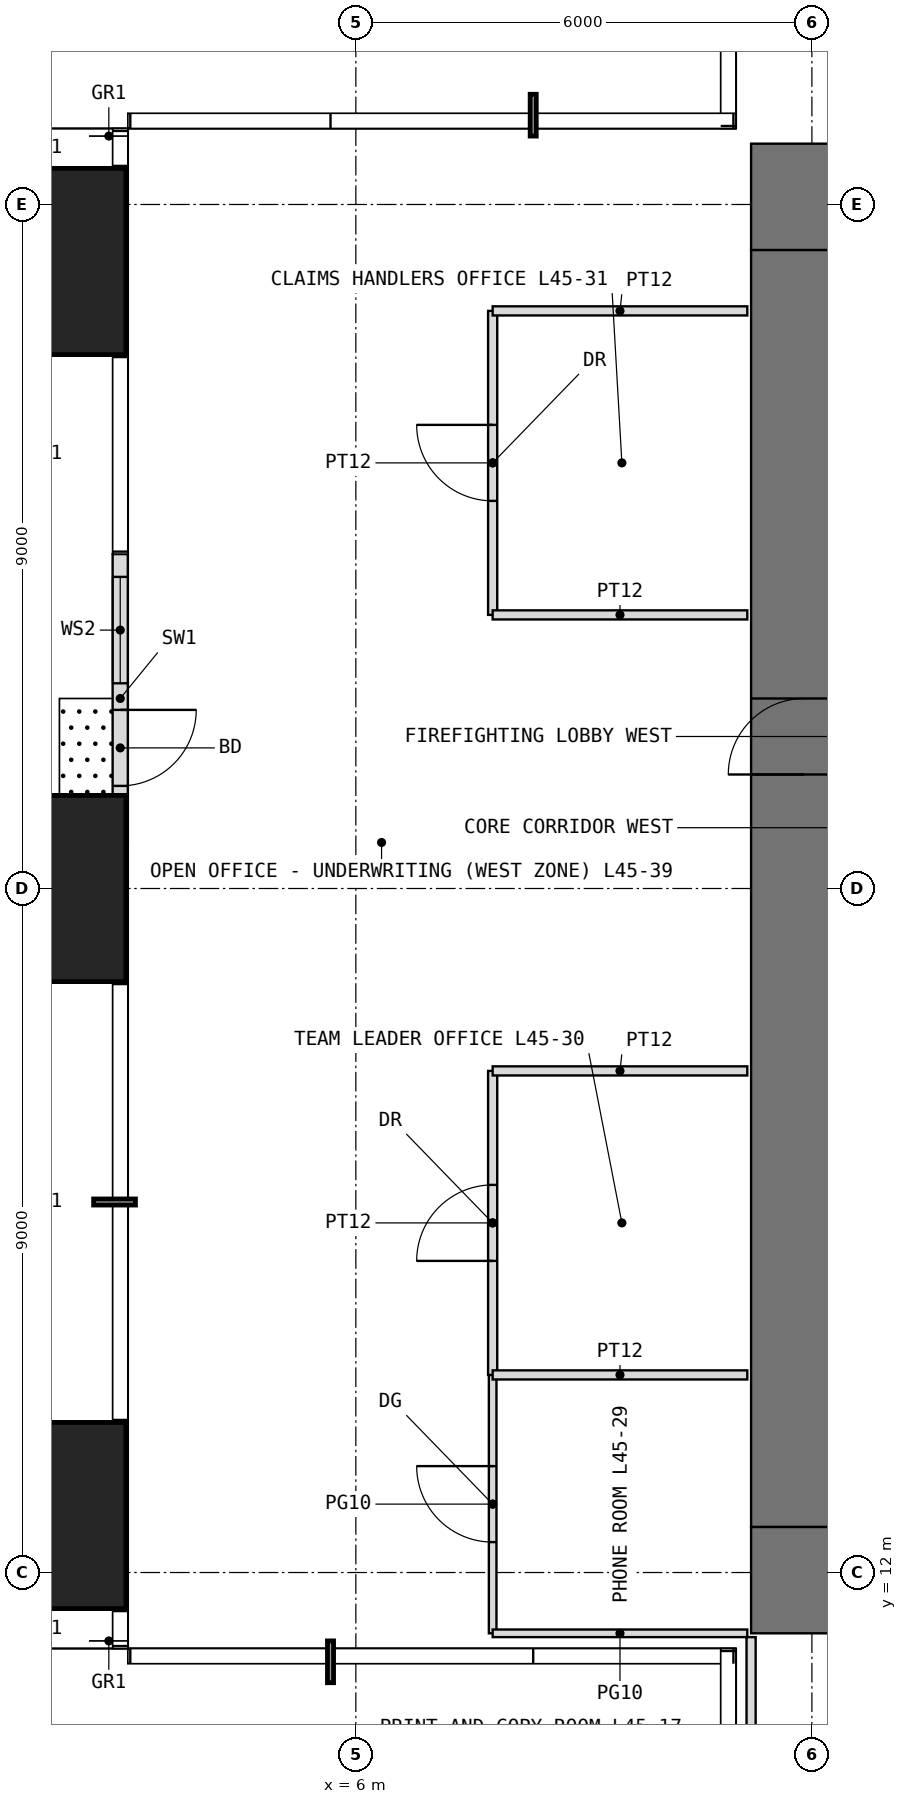
"""IFC4 building model, lengths in metres.
Left out: names, types, materials, properties, quantities, classifications, styles, units other than length and angle.
Written with IfcOpenShell. Run it as: python <this file> out.ifc"""

import sys

from ifc_helpers import new_model, si_unit, direction, frame, frame_2d, origin, origin_2d, place, context, subcontext, project, spatial, rectangle, extrude, element, fill, save


model = new_model("IFC4")
c1 = context("Model", 3, precision=1e-05, world=origin(), true_north=direction((0.0, 1.0)))
c2 = subcontext(c1, "Body", "Model", "MODEL_VIEW")
j1 = project(units=[si_unit("LENGTHUNIT", "METRE"), si_unit("PLANEANGLEUNIT", "RADIAN")], contexts=[c1])
p1 = place(None, origin())
s1 = spatial("IfcSite", under=j1, at=p1, CompositionType="ELEMENT")
p2 = place(p1, origin())
s2 = spatial("IfcBuilding", under=s1, at=p2, CompositionType="ELEMENT")
p3 = place(p2, frame((0.0, 0.0, 190.5)))
s3 = spatial("IfcBuildingStorey", under=s2, at=p3, CompositionType="ELEMENT", Elevation=190.5)
for number, where, z_axis, x_axis in (
    (1, (1.75, 12.75, 0.0), (0.0, 0.0, 1.0), (1.0, 0.0, 0.0)),
    (2, (1.75, 21.0, 0.0), (0.0, 0.0, 1.0), (1.0, 0.0, 0.0)),
    (3, (1.75, 29.25, 0.0), (0.0, 0.0, 1.0), (1.0, 0.0, 0.0)),
):
    element("IfcColumn", number, at=place(p3, frame(where, z_axis=z_axis, x_axis=x_axis)), inside=s3, PredefinedType="COLUMN", context=c2, shape_type="SweptSolid", body=[
        extrude(rectangle(XDim=2.45, YDim=2.45, at=origin_2d()), origin(), (0.0, 0.0, 1.0), 4.0),
    ])
p4 = place(p3, frame((2.9, 25.4, 0.0), z_axis=(0.0, 0.0, 1.0), x_axis=(0.0, -1.0, 0.0)))
e4 = element("IfcWall", 4, at=p4, inside=s3, PredefinedType="USERDEFINED", context=c2, shape_type="SweptSolid", body=[
    extrude(rectangle(XDim=3.8, YDim=0.2, at=frame_2d((1.9, 0.0))), origin(), (0.0, 0.0, 1.0), 3.75),
])
p5 = place(p4, frame((2.05, 0.0, 0.0)))
e5 = element("IfcOpeningElement", 5, at=p5, cuts=e4, PredefinedType="OPENING", context=c2, shape_type="SweptSolid", body=[
    extrude(rectangle(XDim=1.0, YDim=2.4, at=frame_2d((0.5, 1.2))), frame((0.0, 0.11, 0.0), z_axis=(0.0, -1.0, 0.0), x_axis=(1.0, 0.0, 0.0)), (0.0, 0.0, 1.0), 0.22),
])
p6 = place(p4, frame((0.3, 0.0, 0.3)))
e6 = element("IfcOpeningElement", 6, at=p6, cuts=e4, PredefinedType="OPENING", context=c2, shape_type="SweptSolid", body=[
    extrude(rectangle(XDim=1.4, YDim=2.7, at=frame_2d((0.7, 1.35))), frame((0.0, 0.11, 0.0), z_axis=(0.0, -1.0, 0.0), x_axis=(1.0, 0.0, 0.0)), (0.0, 0.0, 1.0), 0.22),
])
p7 = place(p3, frame((11.2, 11.9, -0.05), z_axis=(0.0, 0.0, 1.0), x_axis=(1.0, 0.0, 0.0)))
e7 = element("IfcWall", 7, at=p7, inside=s3, PredefinedType="SHEAR", context=c2, shape_type="SweptSolid", body=[
    extrude(rectangle(XDim=19.6, YDim=1.4, at=frame_2d((9.8, 0.0))), origin(), (0.0, 0.0, 1.0), 4.0),
])
p8 = place(p7, frame((8.8, 0.0, 0.05)))
e8 = element("IfcOpeningElement", 8, at=p8, cuts=e7, PredefinedType="OPENING", context=c2, shape_type="SweptSolid", body=[
    extrude(rectangle(XDim=2.0, YDim=2.2, at=frame_2d((1.0, 1.1))), frame((0.0, 0.71, 0.0), z_axis=(0.0, -1.0, 0.0), x_axis=(1.0, 0.0, 0.0)), (0.0, 0.0, 1.0), 1.42),
])
p9 = place(p3, frame((11.2, 30.1, -0.05), z_axis=(0.0, 0.0, 1.0), x_axis=(1.0, 0.0, 0.0)))
e9 = element("IfcWall", 9, at=p9, inside=s3, PredefinedType="SHEAR", context=c2, shape_type="SweptSolid", body=[
    extrude(rectangle(XDim=19.6, YDim=1.4, at=frame_2d((9.8, 0.0))), origin(), (0.0, 0.0, 1.0), 4.0),
])
p10 = place(p9, frame((8.8, 0.0, 0.05)))
e10 = element("IfcOpeningElement", 10, at=p10, cuts=e9, PredefinedType="OPENING", context=c2, shape_type="SweptSolid", body=[
    extrude(rectangle(XDim=2.0, YDim=2.2, at=frame_2d((1.0, 1.1))), frame((0.0, 0.71, 0.0), z_axis=(0.0, -1.0, 0.0), x_axis=(1.0, 0.0, 0.0)), (0.0, 0.0, 1.0), 1.42),
])
p11 = place(p3, frame((11.9, 12.6, -0.05), z_axis=(0.0, 0.0, 1.0), x_axis=(0.0, 1.0, 0.0)))
e11 = element("IfcWall", 11, at=p11, inside=s3, PredefinedType="SHEAR", context=c2, shape_type="SweptSolid", body=[
    extrude(rectangle(XDim=16.8, YDim=1.4, at=frame_2d((8.4, 0.0))), origin(), (0.0, 0.0, 1.0), 4.0),
])
p12 = place(p11, frame((9.9, 0.0, 0.05)))
e12 = element("IfcOpeningElement", 12, at=p12, cuts=e11, PredefinedType="OPENING", context=c2, shape_type="SweptSolid", body=[
    extrude(rectangle(XDim=1.0, YDim=2.2, at=frame_2d((0.5, 1.1))), frame((0.0, 0.71, 0.0), z_axis=(0.0, -1.0, 0.0), x_axis=(1.0, 0.0, 0.0)), (0.0, 0.0, 1.0), 1.42),
])
p13 = place(p3, frame((7.8, 11.2, 0.0), z_axis=(0.0, 0.0, 1.0), x_axis=(0.0, 1.0, 0.0)))
e13 = element("IfcWall", 13, at=p13, inside=s3, PredefinedType="PARTITIONING", context=c2, shape_type="SweptSolid", body=[
    extrude(rectangle(XDim=3.4, YDim=0.1, at=frame_2d((1.7, 0.0))), origin(), (0.0, 0.0, 1.0), 3.75),
])
p14 = place(p13, frame((1.2, 0.0, 0.0)))
e14 = element("IfcOpeningElement", 14, at=p14, cuts=e13, PredefinedType="OPENING", context=c2, shape_type="SweptSolid", body=[
    extrude(rectangle(XDim=1.0, YDim=2.4, at=frame_2d((0.5, 1.2))), frame((0.0, 0.06, 0.0), z_axis=(0.0, -1.0, 0.0), x_axis=(1.0, 0.0, 0.0)), (0.0, 0.0, 1.0), 0.12),
])
p15 = place(p3, frame((7.8, 11.2, 0.0), z_axis=(0.0, 0.0, 1.0), x_axis=(1.0, 0.0, 0.0)))
e15 = element("IfcWall", 15, at=p15, inside=s3, PredefinedType="PARTITIONING", context=c2, shape_type="SweptSolid", body=[
    extrude(rectangle(XDim=3.35, YDim=0.1, at=frame_2d((1.675, 0.0))), origin(), (0.0, 0.0, 1.0), 3.75),
])
p16 = place(p3, frame((7.8, 14.6, 0.0), z_axis=(0.0, 0.0, 1.0), x_axis=(0.0, 1.0, 0.0)))
e16 = element("IfcWall", 16, at=p16, inside=s3, PredefinedType="PARTITIONING", context=c2, shape_type="SweptSolid", body=[
    extrude(rectangle(XDim=4.0, YDim=0.12, at=frame_2d((2.0, 0.0))), origin(), (0.0, 0.0, 1.0), 3.75),
])
p17 = place(p16, frame((1.5, 0.0, 0.0)))
e17 = element("IfcOpeningElement", 17, at=p17, cuts=e16, PredefinedType="OPENING", context=c2, shape_type="SweptSolid", body=[
    extrude(rectangle(XDim=1.0, YDim=2.2, at=frame_2d((0.5, 1.1))), frame((0.0, 0.07, 0.0), z_axis=(0.0, -1.0, 0.0), x_axis=(1.0, 0.0, 0.0)), (0.0, 0.0, 1.0), 0.14),
])
for number, where, z_axis, x_axis in (
    (18, (7.8, 14.6, 0.0), (0.0, 0.0, 1.0), (1.0, 0.0, 0.0)),
    (19, (7.8, 18.6, 0.0), (0.0, 0.0, 1.0), (1.0, 0.0, 0.0)),
):
    element("IfcWall", number, at=place(p3, frame(where, z_axis=z_axis, x_axis=x_axis)), inside=s3, PredefinedType="PARTITIONING", context=c2, shape_type="SweptSolid", body=[
        extrude(rectangle(XDim=3.35, YDim=0.12, at=frame_2d((1.675, 0.0))), origin(), (0.0, 0.0, 1.0), 3.75),
    ])
p18 = place(p3, frame((7.8, 24.6, 0.0), z_axis=(0.0, 0.0, 1.0), x_axis=(0.0, 1.0, 0.0)))
e20 = element("IfcWall", 20, at=p18, inside=s3, PredefinedType="PARTITIONING", context=c2, shape_type="SweptSolid", body=[
    extrude(rectangle(XDim=4.0, YDim=0.12, at=frame_2d((2.0, 0.0))), origin(), (0.0, 0.0, 1.0), 3.75),
])
p19 = place(p18, frame((1.5, 0.0, 0.0)))
e21 = element("IfcOpeningElement", 21, at=p19, cuts=e20, PredefinedType="OPENING", context=c2, shape_type="SweptSolid", body=[
    extrude(rectangle(XDim=1.0, YDim=2.2, at=frame_2d((0.5, 1.1))), frame((0.0, 0.07, 0.0), z_axis=(0.0, -1.0, 0.0), x_axis=(1.0, 0.0, 0.0)), (0.0, 0.0, 1.0), 0.14),
])
for number, where, z_axis, x_axis in (
    (22, (7.8, 24.6, 0.0), (0.0, 0.0, 1.0), (1.0, 0.0, 0.0)),
    (23, (7.8, 28.6, 0.0), (0.0, 0.0, 1.0), (1.0, 0.0, 0.0)),
):
    element("IfcWall", number, at=place(p3, frame(where, z_axis=z_axis, x_axis=x_axis)), inside=s3, PredefinedType="PARTITIONING", context=c2, shape_type="SweptSolid", body=[
        extrude(rectangle(XDim=3.35, YDim=0.12, at=frame_2d((1.675, 0.0))), origin(), (0.0, 0.0, 1.0), 3.75),
    ])
p20 = place(p3, frame((11.2, 8.7, 0.0), z_axis=(0.0, 0.0, 1.0), x_axis=(0.0, 1.0, 0.0)))
e24 = element("IfcWall", 24, at=p20, inside=s3, PredefinedType="PARTITIONING", context=c2, shape_type="SweptSolid", body=[
    extrude(rectangle(XDim=2.45, YDim=0.12, at=frame_2d((1.225, 0.0))), origin(), (0.0, 0.0, 1.0), 3.75),
])
p21 = place(p5, origin())
e25 = element("IfcDoor", 25, at=p21, inside=s3, OperationType="SINGLE_SWING_LEFT", PredefinedType="DOOR", context=c2, shape_type="SweptSolid", body=[
    extrude(rectangle(XDim=1.0, YDim=2.4, at=frame_2d((0.5, 1.2))), frame((0.0, 0.025, 0.0), z_axis=(0.0, -1.0, 0.0), x_axis=(1.0, 0.0, 0.0)), (0.0, 0.0, 1.0), 0.05),
])
fill(e5, e25)
p22 = place(p6, origin())
e26 = element("IfcWindow", 26, at=p22, inside=s3, PartitioningType="SINGLE_PANEL", PredefinedType="WINDOW", context=c2, shape_type="SweptSolid", body=[
    extrude(rectangle(XDim=1.4, YDim=2.7, at=frame_2d((0.7, 1.35))), frame((0.0, 0.03, 0.0), z_axis=(0.0, -1.0, 0.0), x_axis=(1.0, 0.0, 0.0)), (0.0, 0.0, 1.0), 0.06),
])
fill(e6, e26)
p23 = place(p12, origin())
e27 = element("IfcDoor", 27, at=p23, inside=s3, OperationType="SINGLE_SWING_LEFT", PredefinedType="DOOR", context=c2, shape_type="SweptSolid", body=[
    extrude(rectangle(XDim=1.0, YDim=2.2, at=frame_2d((0.5, 1.1))), frame((0.0, 0.025, 0.0), z_axis=(0.0, -1.0, 0.0), x_axis=(1.0, 0.0, 0.0)), (0.0, 0.0, 1.0), 0.05),
])
fill(e12, e27)
p24 = place(p14, origin())
e28 = element("IfcDoor", 28, at=p24, inside=s3, OperationType="SINGLE_SWING_RIGHT", PredefinedType="DOOR", context=c2, shape_type="SweptSolid", body=[
    extrude(rectangle(XDim=1.0, YDim=2.4, at=frame_2d((0.5, 1.2))), frame((0.0, 0.025, 0.0), z_axis=(0.0, -1.0, 0.0), x_axis=(1.0, 0.0, 0.0)), (0.0, 0.0, 1.0), 0.05),
])
fill(e14, e28)
p25 = place(p17, origin())
e29 = element("IfcDoor", 29, at=p25, inside=s3, OperationType="SINGLE_SWING_LEFT", PredefinedType="DOOR", context=c2, shape_type="SweptSolid", body=[
    extrude(rectangle(XDim=1.0, YDim=2.2, at=frame_2d((0.5, 1.1))), frame((0.0, 0.025, 0.0), z_axis=(0.0, -1.0, 0.0), x_axis=(1.0, 0.0, 0.0)), (0.0, 0.0, 1.0), 0.05),
])
fill(e17, e29)
p26 = place(p19, origin())
e30 = element("IfcDoor", 30, at=p26, inside=s3, OperationType="SINGLE_SWING_RIGHT", PredefinedType="DOOR", context=c2, shape_type="SweptSolid", body=[
    extrude(rectangle(XDim=1.0, YDim=2.2, at=frame_2d((0.5, 1.1))), frame((0.0, 0.025, 0.0), z_axis=(0.0, -1.0, 0.0), x_axis=(1.0, 0.0, 0.0)), (0.0, 0.0, 1.0), 0.05),
])
fill(e21, e30)
save(model, sys.argv[1])
